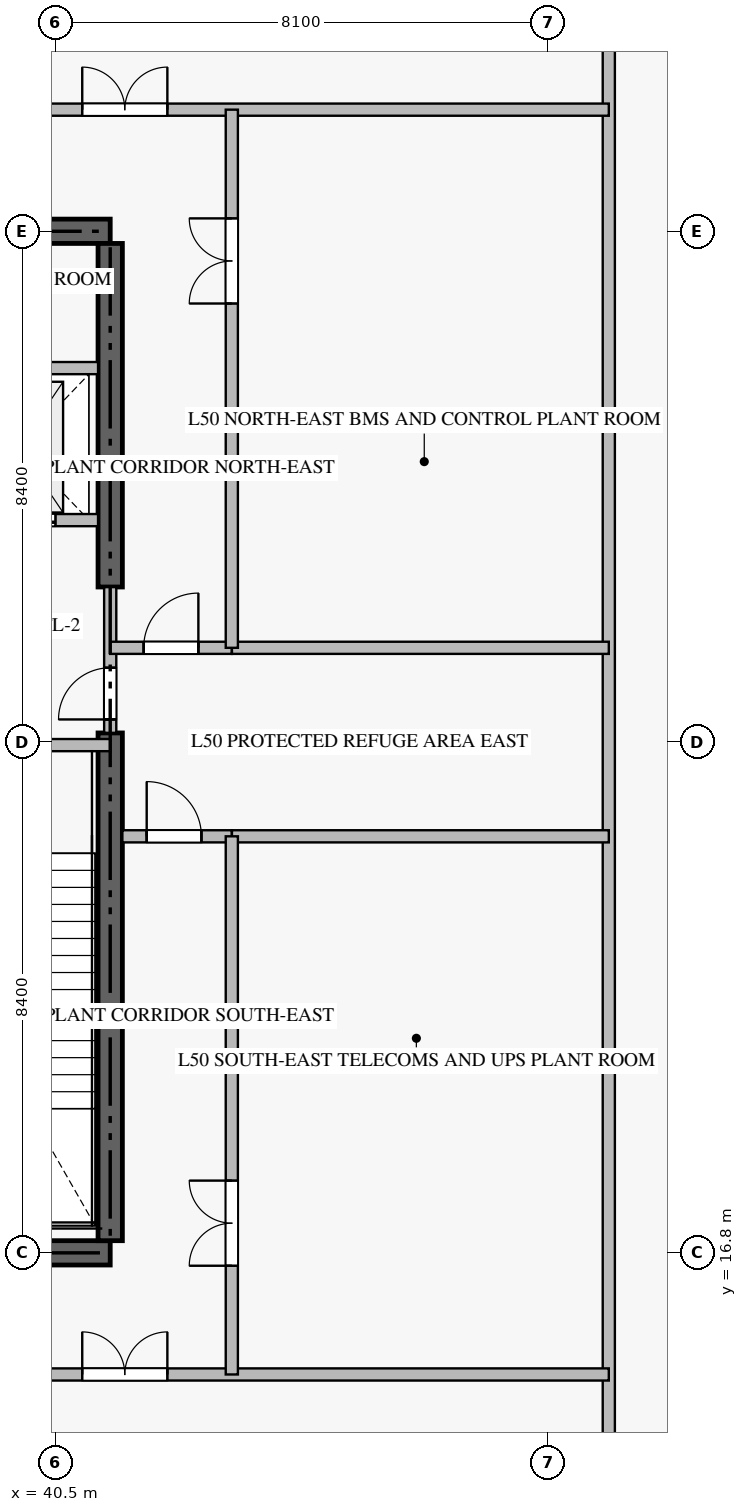
"""IFC4 building model, lengths in metres.
Left out: names, types, materials, properties, quantities, classifications, styles, units other than length and angle.
Written with IfcOpenShell. Run it as: python <this file> out.ifc"""

import sys

from ifc_helpers import new_model, si_unit, direction, frame, frame_2d, origin, place, context, subcontext, project, spatial, rectangle, extrude, source, transform, mapped, element, fill, save


model = new_model("IFC4")
c1 = context("Model", 3, precision=1e-05, world=origin(), true_north=direction((0.0, 1.0)))
c2 = subcontext(c1, "Body", "Model", "MODEL_VIEW")
j1 = project(units=[si_unit("LENGTHUNIT", "METRE"), si_unit("PLANEANGLEUNIT", "RADIAN")], contexts=[c1])
p1 = place(None, origin())
s1 = spatial("IfcSite", under=j1, at=p1, CompositionType="ELEMENT")
p2 = place(p1, origin())
s2 = spatial("IfcBuilding", under=s1, at=p2, CompositionType="ELEMENT")
p3 = place(p2, frame((0.0, 0.0, 198.9)))
s3 = spatial("IfcBuildingStorey", under=s2, at=p3, CompositionType="ELEMENT", Elevation=198.9)
for number, where, z_axis, x_axis in (
    (1, (23.4, 16.8, -0.44), (0.0, 0.0, 1.0), (1.0, 0.0, 0.0)),
    (2, (41.4, 33.6, -0.44), (0.0, 0.0, 1.0), (-1.0, 0.0, 0.0)),
):
    element("IfcWall", number, at=place(p3, frame(where, z_axis=z_axis, x_axis=x_axis)), inside=s3, PredefinedType="SHEAR", context=c2, shape_type="SweptSolid", body=[
        extrude(rectangle(XDim=18.0, YDim=0.4, at=frame_2d((9.0, 0.0))), origin(), (0.0, 0.0, 1.0), 6.078),
    ])
p4 = place(p3, frame((41.4, 17.0, -0.44), z_axis=(0.0, 0.0, 1.0), x_axis=(0.0, 1.0, 0.0)))
e3 = element("IfcWall", 3, at=p4, inside=s3, PredefinedType="SHEAR", context=c2, shape_type="SweptSolid", body=[
    extrude(rectangle(XDim=8.35, YDim=0.4, at=frame_2d((4.175, 0.0))), origin(), (0.0, 0.0, 1.0), 6.078),
])
p5 = place(p3, frame((41.4, 27.75, -0.44), z_axis=(0.0, 0.0, 1.0), x_axis=(0.0, 1.0, 0.0)))
e4 = element("IfcWall", 4, at=p5, inside=s3, PredefinedType="SHEAR", context=c2, shape_type="SweptSolid", body=[
    extrude(rectangle(XDim=5.65, YDim=0.4, at=frame_2d((2.825, 0.0))), origin(), (0.0, 0.0, 1.0), 6.078),
])
p6 = place(p3, frame((36.95, 25.15, 0.0), z_axis=(0.0, 0.0, 1.0), x_axis=(1.0, 0.0, 0.0)))
e5 = element("IfcWall", 5, at=p6, inside=s3, PredefinedType="STANDARD", context=c2, shape_type="SweptSolid", body=[
    extrude(rectangle(XDim=4.45, YDim=0.2, at=frame_2d((2.225, 0.0))), origin(), (0.0, 0.0, 1.0), 5.64),
])
p7 = place(p6, frame((1.65, 0.0, 0.0)))
e6 = element("IfcOpeningElement", 6, at=p7, cuts=e5, PredefinedType="OPENING", context=c2, shape_type="SweptSolid", body=[
    extrude(rectangle(XDim=1.1, YDim=2.15, at=frame_2d((0.55, 1.075))), frame((0.0, 0.11, 0.0), z_axis=(0.0, -1.0, 0.0), x_axis=(1.0, 0.0, 0.0)), (0.0, 0.0, 1.0), 0.22),
])
p8 = place(p3, frame((38.75, 28.85, 0.0), z_axis=(0.0, 0.0, 1.0), x_axis=(1.0, 0.0, 0.0)))
e7 = element("IfcWall", 7, at=p8, inside=s3, PredefinedType="STANDARD", context=c2, shape_type="SweptSolid", body=[
    extrude(rectangle(XDim=2.45, YDim=0.2, at=frame_2d((1.225, 0.0))), origin(), (0.0, 0.0, 1.0), 5.64),
])
p9 = place(p8, frame((0.55, 0.0, 0.0)))
e8 = element("IfcOpeningElement", 8, at=p9, cuts=e7, PredefinedType="OPENING", context=c2, shape_type="SweptSolid", body=[
    extrude(rectangle(XDim=1.2, YDim=2.2, at=frame_2d((0.6, 1.1))), frame((0.0, 0.11, 0.0), z_axis=(0.0, -1.0, 0.0), x_axis=(1.0, 0.0, 0.0)), (0.0, 0.0, 1.0), 0.22),
])
p10 = place(p3, frame((38.75, 31.35, 0.0), z_axis=(0.0, 0.0, 1.0), x_axis=(1.0, 0.0, 0.0)))
e9 = element("IfcWall", 9, at=p10, inside=s3, PredefinedType="STANDARD", context=c2, shape_type="SweptSolid", body=[
    extrude(rectangle(XDim=2.45, YDim=0.2, at=frame_2d((1.225, 0.0))), origin(), (0.0, 0.0, 1.0), 5.64),
])
p11 = place(p3, frame((41.4, 25.352, 0.0), z_axis=(0.0, 0.0, 1.0), x_axis=(0.0, 1.0, 0.0)))
e10 = element("IfcWall", 10, at=p11, inside=s3, PredefinedType="STANDARD", context=c2, shape_type="SweptSolid", body=[
    extrude(rectangle(XDim=2.396, YDim=0.2, at=frame_2d((1.198, 0.0))), origin(), (0.0, 0.0, 1.0), 5.64),
])
p12 = place(p11, frame((0.22, 0.0, 0.0)))
e11 = element("IfcOpeningElement", 11, at=p12, cuts=e10, PredefinedType="OPENING", context=c2, shape_type="SweptSolid", body=[
    extrude(rectangle(XDim=0.85, YDim=2.1, at=frame_2d((0.425, 1.05))), frame((0.0, 0.11, 0.0), z_axis=(0.0, -1.0, 0.0), x_axis=(1.0, 0.0, 0.0)), (0.0, 0.0, 1.0), 0.22),
])
p13 = place(p3, frame((49.6, 9.0, 0.0), z_axis=(0.0, 0.0, 1.0), x_axis=(0.0, 1.0, 0.0)))
e12 = element("IfcWall", 12, at=p13, inside=s3, PredefinedType="STANDARD", context=c2, shape_type="SweptSolid", body=[
    extrude(rectangle(XDim=32.4, YDim=0.2, at=frame_2d((16.2, 0.0))), origin(), (0.0, 0.0, 1.0), 5.64),
])
p14 = place(p3, frame((41.6, 23.65, 0.0), z_axis=(0.0, 0.0, 1.0), x_axis=(1.0, 0.0, 0.0)))
e13 = element("IfcWall", 13, at=p14, inside=s3, PredefinedType="STANDARD", context=c2, shape_type="SweptSolid", body=[
    extrude(rectangle(XDim=1.8, YDim=0.2, at=frame_2d((0.9, 0.0))), origin(), (0.0, 0.0, 1.0), 5.64),
])
p15 = place(p14, frame((0.4, 0.0, 0.0)))
e14 = element("IfcOpeningElement", 14, at=p15, cuts=e13, PredefinedType="OPENING", context=c2, shape_type="SweptSolid", body=[
    extrude(rectangle(XDim=0.9, YDim=2.1, at=frame_2d((0.45, 1.05))), frame((0.0, 0.11, 0.0), z_axis=(0.0, -1.0, 0.0), x_axis=(1.0, 0.0, 0.0)), (0.0, 0.0, 1.0), 0.22),
])
p16 = place(p3, frame((43.402, 23.65, 0.0), z_axis=(0.0, 0.0, 1.0), x_axis=(1.0, 0.0, 0.0)))
e15 = element("IfcWall", 15, at=p16, inside=s3, PredefinedType="STANDARD", context=c2, shape_type="SweptSolid", body=[
    extrude(rectangle(XDim=6.198, YDim=0.2, at=frame_2d((3.099, 0.0))), origin(), (0.0, 0.0, 1.0), 5.64),
])
p17 = place(p3, frame((41.4, 26.75, 0.0), z_axis=(0.0, 0.0, 1.0), x_axis=(1.0, 0.0, 0.0)))
e16 = element("IfcWall", 16, at=p17, inside=s3, PredefinedType="STANDARD", context=c2, shape_type="SweptSolid", body=[
    extrude(rectangle(XDim=2.0, YDim=0.2, at=frame_2d((1.0, 0.0))), origin(), (0.0, 0.0, 1.0), 5.64),
])
p18 = place(p17, frame((0.55, 0.0, 0.0)))
e17 = element("IfcOpeningElement", 17, at=p18, cuts=e16, PredefinedType="OPENING", context=c2, shape_type="SweptSolid", body=[
    extrude(rectangle(XDim=0.9, YDim=2.1, at=frame_2d((0.45, 1.05))), frame((0.0, 0.11, 0.0), z_axis=(0.0, -1.0, 0.0), x_axis=(1.0, 0.0, 0.0)), (0.0, 0.0, 1.0), 0.22),
])
p19 = place(p3, frame((43.402, 26.75, 0.0), z_axis=(0.0, 0.0, 1.0), x_axis=(1.0, 0.0, 0.0)))
e18 = element("IfcWall", 18, at=p19, inside=s3, PredefinedType="STANDARD", context=c2, shape_type="SweptSolid", body=[
    extrude(rectangle(XDim=6.198, YDim=0.2, at=frame_2d((3.099, 0.0))), origin(), (0.0, 0.0, 1.0), 5.64),
])
p20 = place(p3, frame((15.2, 14.8, 0.0), z_axis=(0.0, 0.0, 1.0), x_axis=(1.0, 0.0, 0.0)))
e19 = element("IfcWall", 19, at=p20, inside=s3, PredefinedType="STANDARD", context=c2, shape_type="SweptSolid", body=[
    extrude(rectangle(XDim=34.4, YDim=0.2, at=frame_2d((17.2, 0.0))), origin(), (0.0, 0.0, 1.0), 5.64),
])
p21 = place(p20, frame((7.26, 0.0, 0.0)))
e20 = element("IfcOpeningElement", 20, at=p21, cuts=e19, PredefinedType="OPENING", context=c2, shape_type="SweptSolid", body=[
    extrude(rectangle(XDim=1.4, YDim=2.2, at=frame_2d((0.7, 1.1))), frame((0.0, 0.11, 0.0), z_axis=(0.0, -1.0, 0.0), x_axis=(1.0, 0.0, 0.0)), (0.0, 0.0, 1.0), 0.22),
])
p22 = place(p20, frame((25.74, 0.0, 0.0)))
e21 = element("IfcOpeningElement", 21, at=p22, cuts=e19, PredefinedType="OPENING", context=c2, shape_type="SweptSolid", body=[
    extrude(rectangle(XDim=1.4, YDim=2.2, at=frame_2d((0.7, 1.1))), frame((0.0, 0.11, 0.0), z_axis=(0.0, -1.0, 0.0), x_axis=(1.0, 0.0, 0.0)), (0.0, 0.0, 1.0), 0.22),
])
p23 = place(p3, frame((15.2, 35.6, 0.0), z_axis=(0.0, 0.0, 1.0), x_axis=(1.0, 0.0, 0.0)))
e22 = element("IfcWall", 22, at=p23, inside=s3, PredefinedType="STANDARD", context=c2, shape_type="SweptSolid", body=[
    extrude(rectangle(XDim=34.4, YDim=0.2, at=frame_2d((17.2, 0.0))), origin(), (0.0, 0.0, 1.0), 5.64),
])
p24 = place(p23, frame((7.26, 0.0, 0.0)))
e23 = element("IfcOpeningElement", 23, at=p24, cuts=e22, PredefinedType="OPENING", context=c2, shape_type="SweptSolid", body=[
    extrude(rectangle(XDim=1.4, YDim=2.2, at=frame_2d((0.7, 1.1))), frame((0.0, 0.11, 0.0), z_axis=(0.0, -1.0, 0.0), x_axis=(1.0, 0.0, 0.0)), (0.0, 0.0, 1.0), 0.22),
])
p25 = place(p23, frame((25.74, 0.0, 0.0)))
e24 = element("IfcOpeningElement", 24, at=p25, cuts=e22, PredefinedType="OPENING", context=c2, shape_type="SweptSolid", body=[
    extrude(rectangle(XDim=1.4, YDim=2.2, at=frame_2d((0.7, 1.1))), frame((0.0, 0.11, 0.0), z_axis=(0.0, -1.0, 0.0), x_axis=(1.0, 0.0, 0.0)), (0.0, 0.0, 1.0), 0.22),
])
p26 = place(p3, frame((43.4, 14.8, 0.0), z_axis=(0.0, 0.0, 1.0), x_axis=(0.0, 1.0, 0.0)))
e25 = element("IfcWall", 25, at=p26, inside=s3, PredefinedType="STANDARD", context=c2, shape_type="SweptSolid", body=[
    extrude(rectangle(XDim=8.85, YDim=0.2, at=frame_2d((4.425, 0.0))), origin(), (0.0, 0.0, 1.0), 5.64),
])
p27 = place(p26, frame((1.788, 0.0, 0.0)))
e26 = element("IfcOpeningElement", 26, at=p27, cuts=e25, PredefinedType="OPENING", context=c2, shape_type="SweptSolid", body=[
    extrude(rectangle(XDim=1.4, YDim=2.2, at=frame_2d((0.7, 1.1))), frame((0.0, 0.11, 0.0), z_axis=(0.0, -1.0, 0.0), x_axis=(1.0, 0.0, 0.0)), (0.0, 0.0, 1.0), 0.22),
])
p28 = place(p3, frame((43.4, 26.75, 0.0), z_axis=(0.0, 0.0, 1.0), x_axis=(0.0, 1.0, 0.0)))
e27 = element("IfcWall", 27, at=p28, inside=s3, PredefinedType="STANDARD", context=c2, shape_type="SweptSolid", body=[
    extrude(rectangle(XDim=8.85, YDim=0.2, at=frame_2d((4.425, 0.0))), origin(), (0.0, 0.0, 1.0), 5.64),
])
p29 = place(p28, frame((5.662, 0.0, 0.0)))
e28 = element("IfcOpeningElement", 28, at=p29, cuts=e27, PredefinedType="OPENING", context=c2, shape_type="SweptSolid", body=[
    extrude(rectangle(XDim=1.4, YDim=2.2, at=frame_2d((0.7, 1.1))), frame((0.0, 0.11, 0.0), z_axis=(0.0, -1.0, 0.0), x_axis=(1.0, 0.0, 0.0)), (0.0, 0.0, 1.0), 0.22),
])
m1 = source(origin(), c2, "Body", "SweptSolid", [
    extrude(rectangle(XDim=1.2, YDim=2.2, at=frame_2d((0.6, 1.1))), frame((0.0, 0.025, 0.0), z_axis=(0.0, -1.0, 0.0), x_axis=(1.0, 0.0, 0.0)), (0.0, 0.0, 1.0), 0.05),
])
p30 = place(p9, origin())
e29 = element("IfcDoor", 29, at=p30, inside=s3, OperationType="DOUBLE_DOOR_SLIDING", PredefinedType="DOOR", context=c2, shape_type="MappedRepresentation", body=[
    mapped(m1, transform((0.0, 0.0, 0.0), scale=1.0)),
])
fill(e8, e29)
m2 = source(origin(), c2, "Body", "SweptSolid", [
    extrude(rectangle(XDim=0.85, YDim=2.1, at=frame_2d((0.425, 1.05))), frame((0.0, 0.025, 0.0), z_axis=(0.0, -1.0, 0.0), x_axis=(1.0, 0.0, 0.0)), (0.0, 0.0, 1.0), 0.05),
])
p31 = place(p12, origin())
e30 = element("IfcDoor", 30, at=p31, inside=s3, OperationType="SINGLE_SWING_LEFT", PredefinedType="DOOR", context=c2, shape_type="MappedRepresentation", body=[
    mapped(m2, transform((0.0, 0.0, 0.0), scale=1.0)),
])
fill(e11, e30)
m3 = source(origin(), c2, "Body", "SweptSolid", [
    extrude(rectangle(XDim=0.9, YDim=2.1, at=frame_2d((0.45, 1.05))), frame((0.0, 0.025, 0.0), z_axis=(0.0, -1.0, 0.0), x_axis=(1.0, 0.0, 0.0)), (0.0, 0.0, 1.0), 0.05),
])
p32 = place(p15, origin())
e31 = element("IfcDoor", 31, at=p32, inside=s3, OperationType="SINGLE_SWING_LEFT", PredefinedType="DOOR", context=c2, shape_type="MappedRepresentation", body=[
    mapped(m3, transform((0.0, 0.0, 0.0), scale=1.0)),
])
fill(e14, e31)
p33 = place(p18, origin())
e32 = element("IfcDoor", 32, at=p33, inside=s3, OperationType="SINGLE_SWING_RIGHT", PredefinedType="DOOR", context=c2, shape_type="MappedRepresentation", body=[
    mapped(m3, transform((0.0, 0.0, 0.0), scale=1.0)),
])
fill(e17, e32)
m4 = source(origin(), c2, "Body", "SweptSolid", [
    extrude(rectangle(XDim=1.4, YDim=2.2, at=frame_2d((0.7, 1.1))), frame((0.0, 0.025, 0.0), z_axis=(0.0, -1.0, 0.0), x_axis=(1.0, 0.0, 0.0)), (0.0, 0.0, 1.0), 0.05),
])
p34 = place(p22, origin())
e33 = element("IfcDoor", 33, at=p34, inside=s3, OperationType="DOUBLE_DOOR_SINGLE_SWING", PredefinedType="DOOR", context=c2, shape_type="MappedRepresentation", body=[
    mapped(m4, transform((0.0, 0.0, 0.0), scale=1.0)),
])
fill(e21, e33)
p35 = place(p25, origin())
e34 = element("IfcDoor", 34, at=p35, inside=s3, OperationType="DOUBLE_DOOR_SINGLE_SWING", PredefinedType="DOOR", context=c2, shape_type="MappedRepresentation", body=[
    mapped(m4, transform((0.0, 0.0, 0.0), scale=1.0)),
])
fill(e24, e34)
p36 = place(p27, origin())
e35 = element("IfcDoor", 35, at=p36, inside=s3, OperationType="DOUBLE_DOOR_SINGLE_SWING", PredefinedType="DOOR", context=c2, shape_type="MappedRepresentation", body=[
    mapped(m4, transform((0.0, 0.0, 0.0), scale=1.0)),
])
fill(e26, e35)
p37 = place(p29, origin())
e36 = element("IfcDoor", 36, at=p37, inside=s3, OperationType="DOUBLE_DOOR_SINGLE_SWING", PredefinedType="DOOR", context=c2, shape_type="MappedRepresentation", body=[
    mapped(m4, transform((0.0, 0.0, 0.0), scale=1.0)),
])
fill(e28, e36)
save(model, sys.argv[1])
